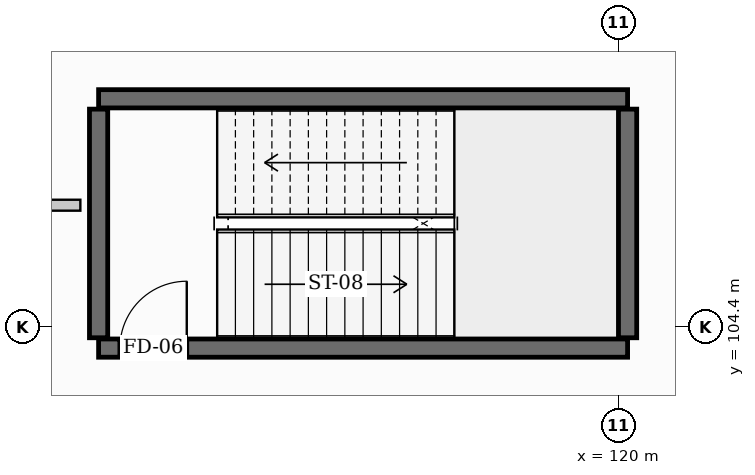
"""IFC4 building model, lengths in metres.
Left out: names, types, materials, properties, quantities, classifications, styles, units other than length and angle.
Written with IfcOpenShell. Run it as: python <this file> out.ifc"""

import sys

from ifc_helpers import new_model, si_unit, direction, frame, frame_2d, origin, place, context, subcontext, project, spatial, rectangle, extrude, element, fill, save


model = new_model("IFC4")
c1 = context("Model", 3, precision=1e-05, world=origin(), true_north=direction((0.0, 1.0)))
c2 = subcontext(c1, "Body", "Model", "MODEL_VIEW")
j1 = project(units=[si_unit("LENGTHUNIT", "METRE"), si_unit("PLANEANGLEUNIT", "RADIAN")], contexts=[c1])
p1 = place(None, origin())
s1 = spatial("IfcSite", under=j1, at=p1, CompositionType="ELEMENT")
p2 = place(p1, origin())
s2 = spatial("IfcBuilding", under=s1, at=p2, CompositionType="ELEMENT")
p3 = place(p2, frame((0.0, 0.0, 9.6)))
s3 = spatial("IfcBuildingStorey", under=s2, at=p3, CompositionType="ELEMENT", Elevation=9.6)
p4 = place(p3, frame((111.45, 104.05, 0.0), z_axis=(0.0, 0.0, 1.0), x_axis=(1.0, 0.0, 0.0)))
e1 = element("IfcWall", 1, at=p4, inside=s3, PredefinedType="SHEAR", context=c2, shape_type="SweptSolid", body=[
    extrude(rectangle(XDim=8.7, YDim=0.3, at=frame_2d((4.35, 0.0))), origin(), (0.0, 0.0, 1.0), 4.8),
])
p5 = place(p4, frame((0.35, 0.0, 0.0)))
e2 = element("IfcOpeningElement", 2, at=p5, cuts=e1, PredefinedType="OPENING", context=c2, shape_type="SweptSolid", body=[
    extrude(rectangle(XDim=1.1, YDim=2.15, at=frame_2d((0.55, 1.075))), frame((0.0, 0.16, 0.0), z_axis=(0.0, -1.0, 0.0), x_axis=(1.0, 0.0, 0.0)), (0.0, 0.0, 1.0), 0.32),
])
p6 = place(p3, frame((120.15, 108.15, 0.0), z_axis=(0.0, 0.0, 1.0), x_axis=(-1.0, 0.0, 0.0)))
e3 = element("IfcWall", 3, at=p6, inside=s3, PredefinedType="SHEAR", context=c2, shape_type="SweptSolid", body=[
    extrude(rectangle(XDim=8.7, YDim=0.3, at=frame_2d((4.35, 0.0))), origin(), (0.0, 0.0, 1.0), 4.8),
])
for number, where, z_axis, x_axis in (
    (4, (111.45, 104.22, 0.0), (0.0, 0.0, 1.0), (0.0, 1.0, 0.0)),
    (5, (120.15, 104.22, 0.0), (0.0, 0.0, 1.0), (0.0, 1.0, 0.0)),
):
    element("IfcWall", number, at=place(p3, frame(where, z_axis=z_axis, x_axis=x_axis)), inside=s3, PredefinedType="SHEAR", context=c2, shape_type="SweptSolid", body=[
        extrude(rectangle(XDim=3.76, YDim=0.3, at=frame_2d((1.88, 0.0))), origin(), (0.0, 0.0, 1.0), 4.8),
    ])
p7 = place(p3, frame((104.8, 106.4, 0.0), z_axis=(0.0, 0.0, 1.0), x_axis=(1.0, 0.0, 0.0)))
e6 = element("IfcWall", 6, at=p7, inside=s3, PredefinedType="PARTITIONING", context=c2, shape_type="SweptSolid", body=[
    extrude(rectangle(XDim=6.35, YDim=0.18, at=frame_2d((3.175, 0.0))), origin(), (0.0, 0.0, 1.0), 3.958),
])
p8 = place(p7, frame((0.32, 0.0, 0.0)))
e7 = element("IfcOpeningElement", 7, at=p8, cuts=e6, PredefinedType="OPENING", context=c2, shape_type="SweptSolid", body=[
    extrude(rectangle(XDim=1.52, YDim=2.16, at=frame_2d((0.76, 1.08))), frame((0.0, 0.1, 0.0), z_axis=(0.0, -1.0, 0.0), x_axis=(1.0, 0.0, 0.0)), (0.0, 0.0, 1.0), 0.2),
])
p9 = place(p5, origin())
e8 = element("IfcDoor", 8, at=p9, inside=s3, OperationType="SINGLE_SWING_RIGHT", PredefinedType="DOOR", context=c2, shape_type="SweptSolid", body=[
    extrude(rectangle(XDim=1.1, YDim=2.15, at=frame_2d((0.55, 1.075))), frame((0.0, 0.025, 0.0), z_axis=(0.0, -1.0, 0.0), x_axis=(1.0, 0.0, 0.0)), (0.0, 0.0, 1.0), 0.05),
])
fill(e2, e8)
save(model, sys.argv[1])
